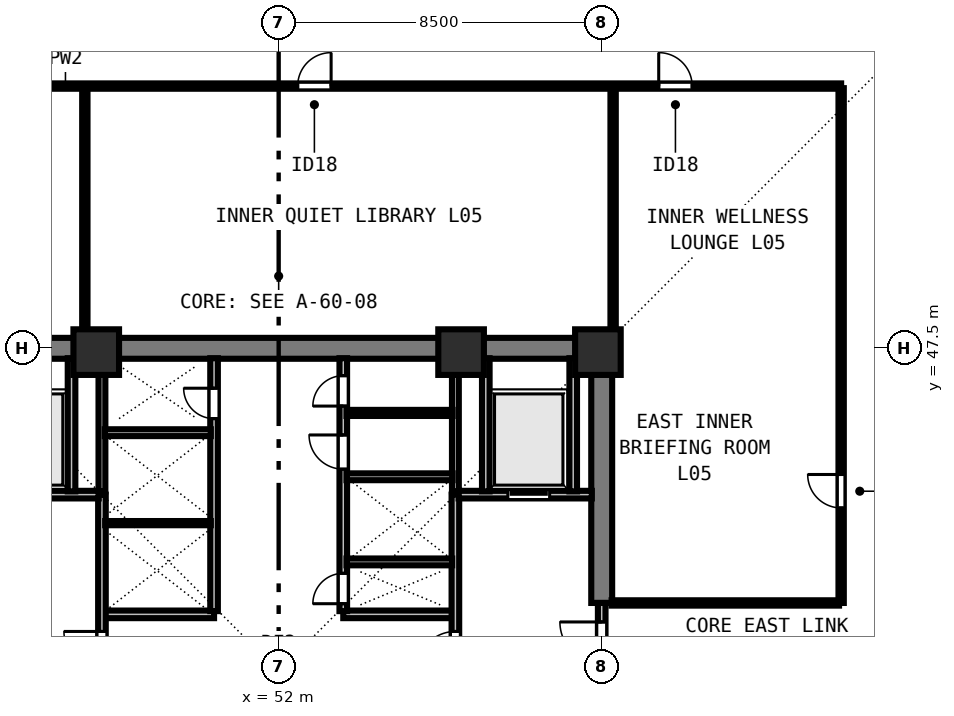
"""IFC4 building model, lengths in metres.
Left out: names, types, materials, properties, quantities, classifications, styles, units other than length and angle.
Written with IfcOpenShell. Run it as: python <this file> out.ifc"""

import sys

from ifc_helpers import new_model, si_unit, direction, frame, frame_2d, origin, origin_2d, place, context, subcontext, project, spatial, rectangle, extrude, element, fill, save


model = new_model("IFC4")
c1 = context("Model", 3, precision=1e-05, world=origin(), true_north=direction((0.0, 1.0)))
c2 = subcontext(c1, "Body", "Model", "MODEL_VIEW")
j1 = project(units=[si_unit("LENGTHUNIT", "METRE"), si_unit("PLANEANGLEUNIT", "RADIAN")], contexts=[c1])
p1 = place(None, origin())
s1 = spatial("IfcSite", under=j1, at=p1, CompositionType="ELEMENT")
p2 = place(p1, origin())
s2 = spatial("IfcBuilding", under=s1, at=p2, CompositionType="ELEMENT")
p3 = place(p2, frame((0.0, 0.0, 23.5)))
s3 = spatial("IfcBuildingStorey", under=s2, at=p3, CompositionType="ELEMENT", Elevation=23.5)
for number, where, z_axis, x_axis in (
    (1, (47.2, 47.4, 0.0), (0.0, 0.0, 1.0), (1.0, 0.0, 0.0)),
    (2, (56.8, 47.4, 0.0), (0.0, 0.0, 1.0), (1.0, 0.0, 0.0)),
    (3, (60.4, 47.4, 0.0), (0.0, 0.0, 1.0), (1.0, 0.0, 0.0)),
):
    element("IfcColumn", number, at=place(p3, frame(where, z_axis=z_axis, x_axis=x_axis)), inside=s3, PredefinedType="COLUMN", context=c2, shape_type="SweptSolid", body=[
        extrude(rectangle(XDim=1.2, YDim=1.2, at=origin_2d()), origin(), (0.0, 0.0, 1.0), 3.5),
    ])
p4 = place(p3, frame((43.225, 47.5, 0.0), z_axis=(0.0, 0.0, 1.0), x_axis=(1.0, 0.0, 0.0)))
e4 = element("IfcWall", 4, at=p4, inside=s3, PredefinedType="SHEAR", context=c2, shape_type="SweptSolid", body=[
    extrude(rectangle(XDim=17.55, YDim=0.55, at=frame_2d((8.775, 0.0))), origin(), (0.0, 0.0, 1.0), 3.28),
])
p5 = place(p3, frame((60.5, 40.8, 0.0), z_axis=(0.0, 0.0, 1.0), x_axis=(0.0, 1.0, 0.0)))
e5 = element("IfcWall", 5, at=p5, inside=s3, PredefinedType="SHEAR", context=c2, shape_type="SweptSolid", body=[
    extrude(rectangle(XDim=6.435, YDim=0.55, at=frame_2d((3.218, 0.0))), origin(), (0.0, 0.0, 1.0), 3.28),
])
for number, where, z_axis, x_axis in (
    (6, (47.35, 40.5, 0.0), (0.0, 0.0, 1.0), (1.0, 0.0, 0.0)),
    (7, (53.7, 40.5, 0.0), (0.0, 0.0, 1.0), (1.0, 0.0, 0.0)),
):
    element("IfcWall", number, at=place(p3, frame(where, z_axis=z_axis, x_axis=x_axis)), inside=s3, PredefinedType="SOLIDWALL", context=c2, shape_type="SweptSolid", body=[
        extrude(rectangle(XDim=2.95, YDim=0.2, at=frame_2d((1.475, 0.0))), origin(), (0.0, 0.0, 1.0), 3.28),
    ])
p6 = place(p3, frame((50.3, 40.585, 0.0), z_axis=(0.0, 0.0, 1.0), x_axis=(0.0, 1.0, 0.0)))
e8 = element("IfcWall", 8, at=p6, inside=s3, PredefinedType="SOLIDWALL", context=c2, shape_type="SweptSolid", body=[
    extrude(rectangle(XDim=6.655, YDim=0.2, at=frame_2d((3.328, 0.0))), origin(), (0.0, 0.0, 1.0), 3.28),
])
p7 = place(p6, frame((5.065, 0.0, 0.0)))
e9 = element("IfcOpeningElement", 9, at=p7, cuts=e8, PredefinedType="OPENING", context=c2, shape_type="SweptSolid", body=[
    extrude(rectangle(XDim=0.8, YDim=2.08, at=frame_2d((0.4, 1.04))), frame((0.0, 0.11, 0.0), z_axis=(0.0, -1.0, 0.0), x_axis=(1.0, 0.0, 0.0)), (0.0, 0.0, 1.0), 0.22),
])
p8 = place(p3, frame((53.7, 40.585, 0.0), z_axis=(0.0, 0.0, 1.0), x_axis=(0.0, 1.0, 0.0)))
e10 = element("IfcWall", 10, at=p8, inside=s3, PredefinedType="SOLIDWALL", context=c2, shape_type="SweptSolid", body=[
    extrude(rectangle(XDim=6.655, YDim=0.2, at=frame_2d((3.328, 0.0))), origin(), (0.0, 0.0, 1.0), 3.28),
])
p9 = place(p8, frame((0.195, 0.0, 0.0)))
e11 = element("IfcOpeningElement", 11, at=p9, cuts=e10, PredefinedType="OPENING", context=c2, shape_type="SweptSolid", body=[
    extrude(rectangle(XDim=0.8, YDim=2.08, at=frame_2d((0.4, 1.04))), frame((0.0, 0.11, 0.0), z_axis=(0.0, -1.0, 0.0), x_axis=(1.0, 0.0, 0.0)), (0.0, 0.0, 1.0), 0.22),
])
p10 = place(p8, frame((3.735, 0.0, 0.0)))
e12 = element("IfcOpeningElement", 12, at=p10, cuts=e10, PredefinedType="OPENING", context=c2, shape_type="SweptSolid", body=[
    extrude(rectangle(XDim=0.9, YDim=2.12, at=frame_2d((0.45, 1.06))), frame((0.0, 0.11, 0.0), z_axis=(0.0, -1.0, 0.0), x_axis=(1.0, 0.0, 0.0)), (0.0, 0.0, 1.0), 0.22),
])
p11 = place(p8, frame((5.395, 0.0, 0.0)))
e13 = element("IfcOpeningElement", 13, at=p11, cuts=e10, PredefinedType="OPENING", context=c2, shape_type="SweptSolid", body=[
    extrude(rectangle(XDim=0.8, YDim=2.1, at=frame_2d((0.4, 1.05))), frame((0.0, 0.11, 0.0), z_axis=(0.0, -1.0, 0.0), x_axis=(1.0, 0.0, 0.0)), (0.0, 0.0, 1.0), 0.22),
])
p12 = place(p3, frame((47.35, 38.785, 0.0), z_axis=(0.0, 0.0, 1.0), x_axis=(0.0, 1.0, 0.0)))
e14 = element("IfcWall", 14, at=p12, inside=s3, PredefinedType="SOLIDWALL", context=c2, shape_type="SweptSolid", body=[
    extrude(rectangle(XDim=4.865, YDim=0.2, at=frame_2d((2.433, 0.0))), origin(), (0.0, 0.0, 1.0), 3.28),
])
p13 = place(p12, frame((0.265, 0.0, 0.0)))
e15 = element("IfcOpeningElement", 15, at=p13, cuts=e14, PredefinedType="OPENING", context=c2, shape_type="SweptSolid", body=[
    extrude(rectangle(XDim=1.0, YDim=2.15, at=frame_2d((0.5, 1.075))), frame((0.0, 0.11, 0.0), z_axis=(0.0, -1.0, 0.0), x_axis=(1.0, 0.0, 0.0)), (0.0, 0.0, 1.0), 0.22),
])
p14 = place(p3, frame((43.76, 43.65, 0.0), z_axis=(0.0, 0.0, 1.0), x_axis=(1.0, 0.0, 0.0)))
e16 = element("IfcWall", 16, at=p14, inside=s3, PredefinedType="SOLIDWALL", context=c2, shape_type="SweptSolid", body=[
    extrude(rectangle(XDim=3.505, YDim=0.2, at=frame_2d((1.752, 0.0))), origin(), (0.0, 0.0, 1.0), 3.28),
])
p15 = place(p14, frame((1.11, 0.0, 0.0)))
e17 = element("IfcOpeningElement", 17, at=p15, cuts=e16, PredefinedType="OPENING", context=c2, shape_type="SweptSolid", body=[
    extrude(rectangle(XDim=1.1, YDim=2.2, at=frame_2d((0.55, 1.1))), frame((0.0, 0.11, 0.0), z_axis=(0.0, -1.0, 0.0), x_axis=(1.0, 0.0, 0.0)), (0.0, 0.0, 1.0), 0.22),
])
p16 = place(p3, frame((46.55, 43.735, 0.0), z_axis=(0.0, 0.0, 1.0), x_axis=(0.0, 1.0, 0.0)))
e18 = element("IfcWall", 18, at=p16, inside=s3, PredefinedType="SOLIDWALL", context=c2, shape_type="SweptSolid", body=[
    extrude(rectangle(XDim=3.505, YDim=0.2, at=frame_2d((1.752, 0.0))), origin(), (0.0, 0.0, 1.0), 3.28),
])
p17 = place(p3, frame((60.5, 38.75, 0.0), z_axis=(0.0, 0.0, 1.0), x_axis=(0.0, 1.0, 0.0)))
e19 = element("IfcWall", 19, at=p17, inside=s3, PredefinedType="SOLIDWALL", context=c2, shape_type="SweptSolid", body=[
    extrude(rectangle(XDim=2.05, YDim=0.2, at=frame_2d((1.025, 0.0))), origin(), (0.0, 0.0, 1.0), 3.28),
])
p18 = place(p17, frame((0.45, 0.0, 0.0)))
e20 = element("IfcOpeningElement", 20, at=p18, cuts=e19, PredefinedType="OPENING", context=c2, shape_type="SweptSolid", body=[
    extrude(rectangle(XDim=1.1, YDim=2.15, at=frame_2d((0.55, 1.075))), frame((0.0, 0.11, 0.0), z_axis=(0.0, -1.0, 0.0), x_axis=(1.0, 0.0, 0.0)), (0.0, 0.0, 1.0), 0.22),
])
p19 = place(p3, frame((56.65, 38.785, 0.0), z_axis=(0.0, 0.0, 1.0), x_axis=(0.0, 1.0, 0.0)))
e21 = element("IfcWall", 21, at=p19, inside=s3, PredefinedType="SOLIDWALL", context=c2, shape_type="SweptSolid", body=[
    extrude(rectangle(XDim=4.865, YDim=0.2, at=frame_2d((2.433, 0.0))), origin(), (0.0, 0.0, 1.0), 3.28),
])
p20 = place(p19, frame((0.265, 0.0, 0.0)))
e22 = element("IfcOpeningElement", 22, at=p20, cuts=e21, PredefinedType="OPENING", context=c2, shape_type="SweptSolid", body=[
    extrude(rectangle(XDim=1.0, YDim=2.15, at=frame_2d((0.5, 1.075))), frame((0.0, 0.11, 0.0), z_axis=(0.0, -1.0, 0.0), x_axis=(1.0, 0.0, 0.0)), (0.0, 0.0, 1.0), 0.22),
])
p21 = place(p3, frame((56.735, 43.65, 0.0), z_axis=(0.0, 0.0, 1.0), x_axis=(1.0, 0.0, 0.0)))
e23 = element("IfcWall", 23, at=p21, inside=s3, PredefinedType="SOLIDWALL", context=c2, shape_type="SweptSolid", body=[
    extrude(rectangle(XDim=3.505, YDim=0.2, at=frame_2d((1.752, 0.0))), origin(), (0.0, 0.0, 1.0), 3.28),
])
p22 = place(p21, frame((1.295, 0.0, 0.0)))
e24 = element("IfcOpeningElement", 24, at=p22, cuts=e23, PredefinedType="OPENING", context=c2, shape_type="SweptSolid", body=[
    extrude(rectangle(XDim=1.1, YDim=2.2, at=frame_2d((0.55, 1.1))), frame((0.0, 0.11, 0.0), z_axis=(0.0, -1.0, 0.0), x_axis=(1.0, 0.0, 0.0)), (0.0, 0.0, 1.0), 0.22),
])
for number, where, z_axis, x_axis in (
    (25, (57.45, 43.735, 0.0), (0.0, 0.0, 1.0), (0.0, 1.0, 0.0)),
    (26, (59.75, 43.735, 0.0), (0.0, 0.0, 1.0), (0.0, 1.0, 0.0)),
):
    element("IfcWall", number, at=place(p3, frame(where, z_axis=z_axis, x_axis=x_axis)), inside=s3, PredefinedType="SOLIDWALL", context=c2, shape_type="SweptSolid", body=[
        extrude(rectangle(XDim=3.505, YDim=0.2, at=frame_2d((1.752, 0.0))), origin(), (0.0, 0.0, 1.0), 3.28),
    ])
p23 = place(p3, frame((47.35, 43.735, 0.0), z_axis=(0.0, 0.0, 1.0), x_axis=(0.0, 1.0, 0.0)))
e27 = element("IfcWall", 27, at=p23, inside=s3, PredefinedType="SOLIDWALL", context=c2, shape_type="SweptSolid", body=[
    extrude(rectangle(XDim=3.505, YDim=0.18, at=frame_2d((1.752, 0.0))), origin(), (0.0, 0.0, 1.0), 3.28),
])
p24 = place(p3, frame((47.435, 42.9, 0.0), z_axis=(0.0, 0.0, 1.0), x_axis=(1.0, 0.0, 0.0)))
e28 = element("IfcWall", 28, at=p24, inside=s3, PredefinedType="PARTITIONING", context=c2, shape_type="SweptSolid", body=[
    extrude(rectangle(XDim=2.78, YDim=0.11, at=frame_2d((1.39, 0.0))), origin(), (0.0, 0.0, 1.0), 3.28),
])
p25 = place(p3, frame((47.425, 45.28, 0.0), z_axis=(0.0, 0.0, 1.0), x_axis=(1.0, 0.0, 0.0)))
e29 = element("IfcWall", 29, at=p25, inside=s3, PredefinedType="SOLIDWALL", context=c2, shape_type="SweptSolid", body=[
    extrude(rectangle(XDim=2.79, YDim=0.18, at=frame_2d((1.395, 0.0))), origin(), (0.0, 0.0, 1.0), 3.28),
])
p26 = place(p3, frame((56.65, 43.735, 0.0), z_axis=(0.0, 0.0, 1.0), x_axis=(0.0, 1.0, 0.0)))
e30 = element("IfcWall", 30, at=p26, inside=s3, PredefinedType="SOLIDWALL", context=c2, shape_type="SweptSolid", body=[
    extrude(rectangle(XDim=3.505, YDim=0.18, at=frame_2d((1.752, 0.0))), origin(), (0.0, 0.0, 1.0), 3.28),
])
p27 = place(p3, frame((53.785, 41.88, 0.0), z_axis=(0.0, 0.0, 1.0), x_axis=(1.0, 0.0, 0.0)))
e31 = element("IfcWall", 31, at=p27, inside=s3, PredefinedType="SOLIDWALL", context=c2, shape_type="SweptSolid", body=[
    extrude(rectangle(XDim=2.78, YDim=0.18, at=frame_2d((1.39, 0.0))), origin(), (0.0, 0.0, 1.0), 3.28),
])
p28 = place(p3, frame((53.785, 44.12, 0.0), z_axis=(0.0, 0.0, 1.0), x_axis=(1.0, 0.0, 0.0)))
e32 = element("IfcWall", 32, at=p28, inside=s3, PredefinedType="SOLIDWALL", context=c2, shape_type="SweptSolid", body=[
    extrude(rectangle(XDim=2.79, YDim=0.18, at=frame_2d((1.395, 0.0))), origin(), (0.0, 0.0, 1.0), 3.28),
])
p29 = place(p3, frame((53.785, 45.8, 0.0), z_axis=(0.0, 0.0, 1.0), x_axis=(1.0, 0.0, 0.0)))
e33 = element("IfcWall", 33, at=p29, inside=s3, PredefinedType="PARTITIONING", context=c2, shape_type="SweptSolid", body=[
    extrude(rectangle(XDim=2.79, YDim=0.16, at=frame_2d((1.395, 0.0))), origin(), (0.0, 0.0, 1.0), 3.28),
])
p30 = place(p3, frame((37.2, 54.4, 0.0), z_axis=(0.0, 0.0, 1.0), x_axis=(1.0, 0.0, 0.0)))
e34 = element("IfcWall", 34, at=p30, inside=s3, PredefinedType="PARTITIONING", context=c2, shape_type="SweptSolid", body=[
    extrude(rectangle(XDim=29.6, YDim=0.14, at=frame_2d((14.8, 0.0))), origin(), (0.0, 0.0, 1.0), 3.28),
])
p31 = place(p30, frame((2.2, 0.0, 0.0)))
e35 = element("IfcOpeningElement", 35, at=p31, cuts=e34, PredefinedType="OPENING", context=c2, shape_type="SweptSolid", body=[
    extrude(rectangle(XDim=0.88, YDim=2.1, at=frame_2d((0.44, 1.05))), frame((0.0, 0.08, 0.0), z_axis=(0.0, -1.0, 0.0), x_axis=(1.0, 0.0, 0.0)), (0.0, 0.0, 1.0), 0.16),
])
p32 = place(p30, frame((15.3, 0.0, 0.0)))
e36 = element("IfcOpeningElement", 36, at=p32, cuts=e34, PredefinedType="OPENING", context=c2, shape_type="SweptSolid", body=[
    extrude(rectangle(XDim=0.88, YDim=2.1, at=frame_2d((0.44, 1.05))), frame((0.0, 0.08, 0.0), z_axis=(0.0, -1.0, 0.0), x_axis=(1.0, 0.0, 0.0)), (0.0, 0.0, 1.0), 0.16),
])
p33 = place(p30, frame((24.8, 0.0, 0.0)))
e37 = element("IfcOpeningElement", 37, at=p33, cuts=e34, PredefinedType="OPENING", context=c2, shape_type="SweptSolid", body=[
    extrude(rectangle(XDim=0.88, YDim=2.1, at=frame_2d((0.44, 1.05))), frame((0.0, 0.08, 0.0), z_axis=(0.0, -1.0, 0.0), x_axis=(1.0, 0.0, 0.0)), (0.0, 0.0, 1.0), 0.16),
])
p34 = place(p3, frame((66.8, 40.8, 0.0), z_axis=(0.0, 0.0, 1.0), x_axis=(0.0, 1.0, 0.0)))
e38 = element("IfcWall", 38, at=p34, inside=s3, PredefinedType="PARTITIONING", context=c2, shape_type="SweptSolid", body=[
    extrude(rectangle(XDim=13.545, YDim=0.14, at=frame_2d((6.772, 0.0))), origin(), (0.0, 0.0, 1.0), 3.28),
])
p35 = place(p34, frame((2.5, 0.0, 0.0)))
e39 = element("IfcOpeningElement", 39, at=p35, cuts=e38, PredefinedType="OPENING", context=c2, shape_type="SweptSolid", body=[
    extrude(rectangle(XDim=0.88, YDim=2.1, at=frame_2d((0.44, 1.05))), frame((0.0, 0.08, 0.0), z_axis=(0.0, -1.0, 0.0), x_axis=(1.0, 0.0, 0.0)), (0.0, 0.0, 1.0), 0.16),
])
p36 = place(p3, frame((60.76, 40.8, 0.0), z_axis=(0.0, 0.0, 1.0), x_axis=(1.0, 0.0, 0.0)))
e40 = element("IfcWall", 40, at=p36, inside=s3, PredefinedType="PARTITIONING", context=c2, shape_type="SweptSolid", body=[
    extrude(rectangle(XDim=5.985, YDim=0.14, at=frame_2d((2.993, 0.0))), origin(), (0.0, 0.0, 1.0), 3.28),
])
p37 = place(p3, frame((46.9, 47.76, 0.0), z_axis=(0.0, 0.0, 1.0), x_axis=(0.0, 1.0, 0.0)))
e41 = element("IfcWall", 41, at=p37, inside=s3, PredefinedType="PARTITIONING", context=c2, shape_type="SweptSolid", body=[
    extrude(rectangle(XDim=6.585, YDim=0.14, at=frame_2d((3.292, 0.0))), origin(), (0.0, 0.0, 1.0), 3.28),
])
p38 = place(p3, frame((60.8, 47.76, 0.0), z_axis=(0.0, 0.0, 1.0), x_axis=(0.0, 1.0, 0.0)))
e42 = element("IfcWall", 42, at=p38, inside=s3, PredefinedType="PARTITIONING", context=c2, shape_type="SweptSolid", body=[
    extrude(rectangle(XDim=6.585, YDim=0.14, at=frame_2d((3.292, 0.0))), origin(), (0.0, 0.0, 1.0), 2.439),
])
p39 = place(p13, origin())
e43 = element("IfcDoor", 43, at=p39, inside=s3, OperationType="SINGLE_SWING_RIGHT", PredefinedType="DOOR", context=c2, shape_type="SweptSolid", body=[
    extrude(rectangle(XDim=1.0, YDim=2.15, at=frame_2d((0.5, 1.075))), frame((0.0, 0.025, 0.0), z_axis=(0.0, -1.0, 0.0), x_axis=(1.0, 0.0, 0.0)), (0.0, 0.0, 1.0), 0.05),
])
fill(e15, e43)
p40 = place(p18, origin())
e44 = element("IfcDoor", 44, at=p40, inside=s3, OperationType="SINGLE_SWING_RIGHT", PredefinedType="DOOR", context=c2, shape_type="SweptSolid", body=[
    extrude(rectangle(XDim=1.1, YDim=2.15, at=frame_2d((0.55, 1.075))), frame((0.0, 0.025, 0.0), z_axis=(0.0, -1.0, 0.0), x_axis=(1.0, 0.0, 0.0)), (0.0, 0.0, 1.0), 0.05),
])
fill(e20, e44)
p41 = place(p20, origin())
e45 = element("IfcDoor", 45, at=p41, inside=s3, OperationType="SINGLE_SWING_LEFT", PredefinedType="DOOR", context=c2, shape_type="SweptSolid", body=[
    extrude(rectangle(XDim=1.0, YDim=2.15, at=frame_2d((0.5, 1.075))), frame((0.0, 0.025, 0.0), z_axis=(0.0, -1.0, 0.0), x_axis=(1.0, 0.0, 0.0)), (0.0, 0.0, 1.0), 0.05),
])
fill(e22, e45)
p42 = place(p22, origin())
e46 = element("IfcDoor", 46, at=p42, inside=s3, OperationType="SLIDING_TO_LEFT", PredefinedType="DOOR", context=c2, shape_type="SweptSolid", body=[
    extrude(rectangle(XDim=1.1, YDim=2.2, at=frame_2d((0.55, 1.1))), frame((0.0, 0.025, 0.0), z_axis=(0.0, -1.0, 0.0), x_axis=(1.0, 0.0, 0.0)), (0.0, 0.0, 1.0), 0.05),
])
fill(e24, e46)
p43 = place(p7, origin())
e47 = element("IfcDoor", 47, at=p43, inside=s3, OperationType="SINGLE_SWING_RIGHT", PredefinedType="DOOR", context=c2, shape_type="SweptSolid", body=[
    extrude(rectangle(XDim=0.8, YDim=2.08, at=frame_2d((0.4, 1.04))), frame((0.0, 0.025, 0.0), z_axis=(0.0, -1.0, 0.0), x_axis=(1.0, 0.0, 0.0)), (0.0, 0.0, 1.0), 0.05),
])
fill(e9, e47)
p44 = place(p9, origin())
e48 = element("IfcDoor", 48, at=p44, inside=s3, OperationType="SINGLE_SWING_LEFT", PredefinedType="DOOR", context=c2, shape_type="SweptSolid", body=[
    extrude(rectangle(XDim=0.8, YDim=2.08, at=frame_2d((0.4, 1.04))), frame((0.0, 0.025, 0.0), z_axis=(0.0, -1.0, 0.0), x_axis=(1.0, 0.0, 0.0)), (0.0, 0.0, 1.0), 0.05),
])
fill(e11, e48)
p45 = place(p10, origin())
e49 = element("IfcDoor", 49, at=p45, inside=s3, OperationType="SINGLE_SWING_RIGHT", PredefinedType="DOOR", context=c2, shape_type="SweptSolid", body=[
    extrude(rectangle(XDim=0.9, YDim=2.12, at=frame_2d((0.45, 1.06))), frame((0.0, 0.025, 0.0), z_axis=(0.0, -1.0, 0.0), x_axis=(1.0, 0.0, 0.0)), (0.0, 0.0, 1.0), 0.05),
])
fill(e12, e49)
p46 = place(p11, origin())
e50 = element("IfcDoor", 50, at=p46, inside=s3, OperationType="SINGLE_SWING_LEFT", PredefinedType="DOOR", context=c2, shape_type="SweptSolid", body=[
    extrude(rectangle(XDim=0.8, YDim=2.1, at=frame_2d((0.4, 1.05))), frame((0.0, 0.025, 0.0), z_axis=(0.0, -1.0, 0.0), x_axis=(1.0, 0.0, 0.0)), (0.0, 0.0, 1.0), 0.05),
])
fill(e13, e50)
p47 = place(p32, origin())
e51 = element("IfcDoor", 51, at=p47, inside=s3, OperationType="SINGLE_SWING_RIGHT", PredefinedType="DOOR", context=c2, shape_type="SweptSolid", body=[
    extrude(rectangle(XDim=0.88, YDim=2.1, at=frame_2d((0.44, 1.05))), frame((0.0, 0.025, 0.0), z_axis=(0.0, -1.0, 0.0), x_axis=(1.0, 0.0, 0.0)), (0.0, 0.0, 1.0), 0.05),
])
fill(e36, e51)
p48 = place(p33, origin())
e52 = element("IfcDoor", 52, at=p48, inside=s3, OperationType="SINGLE_SWING_LEFT", PredefinedType="DOOR", context=c2, shape_type="SweptSolid", body=[
    extrude(rectangle(XDim=0.88, YDim=2.1, at=frame_2d((0.44, 1.05))), frame((0.0, 0.025, 0.0), z_axis=(0.0, -1.0, 0.0), x_axis=(1.0, 0.0, 0.0)), (0.0, 0.0, 1.0), 0.05),
])
fill(e37, e52)
p49 = place(p35, origin())
e53 = element("IfcDoor", 53, at=p49, inside=s3, OperationType="SINGLE_SWING_RIGHT", PredefinedType="DOOR", context=c2, shape_type="SweptSolid", body=[
    extrude(rectangle(XDim=0.88, YDim=2.1, at=frame_2d((0.44, 1.05))), frame((0.0, 0.025, 0.0), z_axis=(0.0, -1.0, 0.0), x_axis=(1.0, 0.0, 0.0)), (0.0, 0.0, 1.0), 0.05),
])
fill(e39, e53)
save(model, sys.argv[1])
